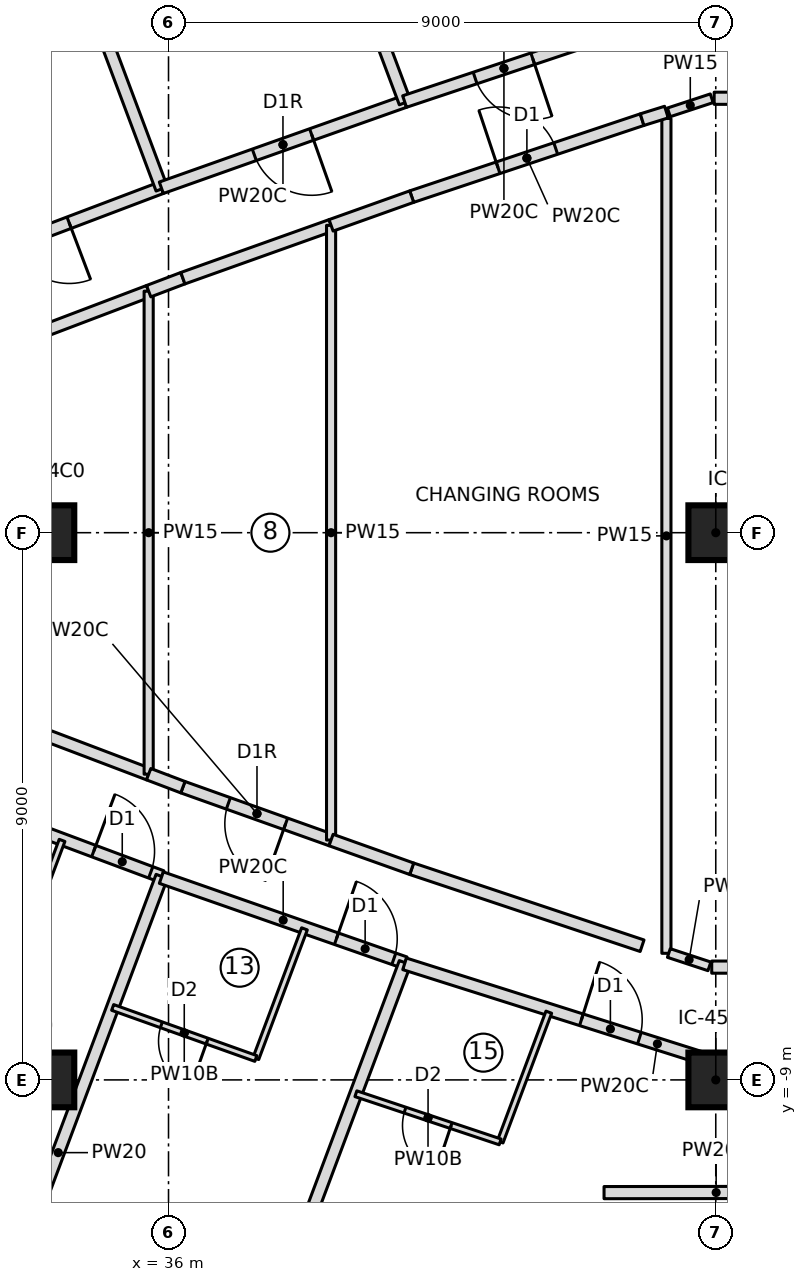
"""IFC4 building model, lengths in metres.
Left out: names, types, materials, properties, quantities, classifications, styles, units other than length and angle.
Written with IfcOpenShell. Run it as: python <this file> out.ifc"""

import sys

from ifc_helpers import new_model, si_unit, direction, frame, frame_2d, origin, origin_2d, place, context, subcontext, project, spatial, rectangle, extrude, element, fill, save


model = new_model("IFC4")
c1 = context("Model", 3, precision=1e-05, world=origin(), true_north=direction((0.0, 1.0)))
c2 = subcontext(c1, "Body", "Model", "MODEL_VIEW")
j1 = project(units=[si_unit("LENGTHUNIT", "METRE"), si_unit("PLANEANGLEUNIT", "RADIAN")], contexts=[c1])
p1 = place(None, origin())
s1 = spatial("IfcSite", under=j1, at=p1, CompositionType="ELEMENT")
p2 = place(p1, origin())
s2 = spatial("IfcBuilding", under=s1, at=p2, CompositionType="ELEMENT")
p3 = place(p2, frame((0.0, 0.0, 245.65)))
s3 = spatial("IfcBuildingStorey", under=s2, at=p3, CompositionType="ELEMENT", Elevation=245.65)
for number, where, z_axis, x_axis in (
    (1, (34.0, -9.0, 0.0), (0.0, 0.0, 1.0), (1.0, 0.0, 0.0)),
    (2, (34.0, 0.0, 0.0), (0.0, 0.0, 1.0), (1.0, 0.0, 0.0)),
    (3, (45.0, -9.0, 0.0), (0.0, 0.0, 1.0), (1.0, 0.0, 0.0)),
    (4, (45.0, 0.0, 0.0), (0.0, 0.0, 1.0), (1.0, 0.0, 0.0)),
):
    element("IfcColumn", number, at=place(p3, frame(where, z_axis=z_axis, x_axis=x_axis)), inside=s3, PredefinedType="COLUMN", context=c2, shape_type="SweptSolid", body=[
        extrude(rectangle(XDim=0.9, YDim=0.9, at=origin_2d()), origin(), (0.0, 0.0, 1.0), 3.55),
    ])
p4 = place(p3, frame((35.882, 5.673, 0.0), z_axis=(0.0, 0.0, 1.0), x_axis=(-0.935189471058, -0.354147784438, 0.0)))
e5 = element("IfcWall", 5, at=p4, inside=s3, PredefinedType="PARTITIONING", context=c2, shape_type="SweptSolid", body=[
    extrude(rectangle(XDim=4.244, YDim=0.2, at=frame_2d((2.122, 0.0))), origin(), (0.0, 0.0, 1.0), 3.25),
])
p5 = place(p4, frame((1.622, 0.0, 0.0)))
e6 = element("IfcOpeningElement", 6, at=p5, cuts=e5, PredefinedType="OPENING", context=c2, shape_type="SweptSolid", body=[
    extrude(rectangle(XDim=1.0, YDim=2.1, at=frame_2d((0.5, 1.05))), frame((0.0, 0.11, 0.0), z_axis=(0.0, -1.0, 0.0), x_axis=(1.0, 0.0, 0.0)), (0.0, 0.0, 1.0), 0.22),
])
p6 = place(p3, frame((35.889, 5.654, 0.0), z_axis=(0.0, 0.0, 1.0), x_axis=(-0.351117925717, 0.936331246002, 0.0)))
e7 = element("IfcWall", 7, at=p6, inside=s3, PredefinedType="PARTITIONING", context=c2, shape_type="SweptSolid", body=[
    extrude(rectangle(XDim=9.701, YDim=0.2, at=frame_2d((4.851, 0.0))), origin(), (0.0, 0.0, 1.0), 3.25),
])
p7 = place(p3, frame((39.882, 7.091, 0.0), z_axis=(0.0, 0.0, 1.0), x_axis=(-0.942537055217, -0.334101630559, 0.0)))
e8 = element("IfcWall", 8, at=p7, inside=s3, PredefinedType="PARTITIONING", context=c2, shape_type="SweptSolid", body=[
    extrude(rectangle(XDim=4.244, YDim=0.2, at=frame_2d((2.122, 0.0))), origin(), (0.0, 0.0, 1.0), 3.25),
])
p8 = place(p7, frame((1.622, 0.0, 0.0)))
e9 = element("IfcOpeningElement", 9, at=p8, cuts=e8, PredefinedType="OPENING", context=c2, shape_type="SweptSolid", body=[
    extrude(rectangle(XDim=1.0, YDim=2.1, at=frame_2d((0.5, 1.05))), frame((0.0, 0.11, 0.0), z_axis=(0.0, -1.0, 0.0), x_axis=(1.0, 0.0, 0.0)), (0.0, 0.0, 1.0), 0.22),
])
p9 = place(p3, frame((39.889, 7.072, 0.0), z_axis=(0.0, 0.0, 1.0), x_axis=(-0.35112895446, 0.936327110224, 0.0)))
e10 = element("IfcWall", 10, at=p9, inside=s3, PredefinedType="PARTITIONING", context=c2, shape_type="SweptSolid", body=[
    extrude(rectangle(XDim=9.706, YDim=0.2, at=frame_2d((4.853, 0.0))), origin(), (0.0, 0.0, 1.0), 3.25),
])
p10 = place(p3, frame((43.15, 8.183, 0.0), z_axis=(0.0, 0.0, 1.0), x_axis=(-0.948477584784, -0.316844238013, 0.0)))
e11 = element("IfcWall", 11, at=p10, inside=s3, PredefinedType="PARTITIONING", context=c2, shape_type="SweptSolid", body=[
    extrude(rectangle(XDim=3.445, YDim=0.2, at=frame_2d((1.723, 0.0))), origin(), (0.0, 0.0, 1.0), 3.25),
])
p11 = place(p10, frame((1.222, 0.0, 0.0)))
e12 = element("IfcOpeningElement", 12, at=p11, cuts=e11, PredefinedType="OPENING", context=c2, shape_type="SweptSolid", body=[
    extrude(rectangle(XDim=1.0, YDim=2.1, at=frame_2d((0.5, 1.05))), frame((0.0, 0.11, 0.0), z_axis=(0.0, -1.0, 0.0), x_axis=(1.0, 0.0, 0.0)), (0.0, 0.0, 1.0), 0.22),
])
p12 = place(p3, frame((31.913, -4.17, 0.0), z_axis=(0.0, 0.0, 1.0), x_axis=(0.936848300955, -0.349735987565, 0.0)))
e13 = element("IfcWall", 13, at=p12, inside=s3, PredefinedType="PARTITIONING", context=c2, shape_type="SweptSolid", body=[
    extrude(rectangle(XDim=4.244, YDim=0.2, at=frame_2d((2.122, 0.0))), origin(), (0.0, 0.0, 1.0), 3.25),
])
p13 = place(p12, frame((3.05, 0.0, 0.0)))
e14 = element("IfcOpeningElement", 14, at=p13, cuts=e13, PredefinedType="OPENING", context=c2, shape_type="SweptSolid", body=[
    extrude(rectangle(XDim=1.0, YDim=2.1, at=frame_2d((0.5, 1.05))), frame((0.0, 0.11, 0.0), z_axis=(0.0, -1.0, 0.0), x_axis=(1.0, 0.0, 0.0)), (0.0, 0.0, 1.0), 0.22),
])
p14 = place(p3, frame((34.25, -5.061, 0.0), z_axis=(0.0, 0.0, 1.0), x_axis=(-0.351135191353, -0.936324771323, 0.0)))
e15 = element("IfcWall", 15, at=p14, inside=s3, PredefinedType="PARTITIONING", context=c2, shape_type="SweptSolid", body=[
    extrude(rectangle(XDim=2.277, YDim=0.1, at=frame_2d((1.139, 0.0))), origin(), (0.0, 0.0, 1.0), 3.25),
])
p15 = place(p3, frame((32.483, -14.738, 0.0), z_axis=(0.0, 0.0, 1.0), x_axis=(0.351117925717, 0.936331246002, 0.0)))
e16 = element("IfcWall", 16, at=p15, inside=s3, PredefinedType="PARTITIONING", context=c2, shape_type="SweptSolid", body=[
    extrude(rectangle(XDim=9.701, YDim=0.2, at=frame_2d((4.851, 0.0))), origin(), (0.0, 0.0, 1.0), 3.25),
])
p16 = place(p3, frame((35.882, -5.673, 0.0), z_axis=(0.0, 0.0, 1.0), x_axis=(0.944107376821, -0.329638075823, 0.0)))
e17 = element("IfcWall", 17, at=p16, inside=s3, PredefinedType="PARTITIONING", context=c2, shape_type="SweptSolid", body=[
    extrude(rectangle(XDim=4.245, YDim=0.2, at=frame_2d((2.122, 0.0))), origin(), (0.0, 0.0, 1.0), 3.25),
])
p17 = place(p16, frame((3.05, 0.0, 0.0)))
e18 = element("IfcOpeningElement", 18, at=p17, cuts=e17, PredefinedType="OPENING", context=c2, shape_type="SweptSolid", body=[
    extrude(rectangle(XDim=1.0, YDim=2.1, at=frame_2d((0.5, 1.05))), frame((0.0, 0.11, 0.0), z_axis=(0.0, -1.0, 0.0), x_axis=(1.0, 0.0, 0.0)), (0.0, 0.0, 1.0), 0.22),
])
p18 = place(p3, frame((38.236, -6.516, 0.0), z_axis=(0.0, 0.0, 1.0), x_axis=(-0.351229183496, -0.936289517543, 0.0)))
e19 = element("IfcWall", 19, at=p18, inside=s3, PredefinedType="PARTITIONING", context=c2, shape_type="SweptSolid", body=[
    extrude(rectangle(XDim=2.277, YDim=0.1, at=frame_2d((1.139, 0.0))), origin(), (0.0, 0.0, 1.0), 3.25),
])
p19 = place(p3, frame((37.436, -8.648, 0.0), z_axis=(0.0, 0.0, 1.0), x_axis=(-0.941896455552, 0.335903359641, 0.0)))
e20 = element("IfcWall", 20, at=p19, inside=s3, PredefinedType="PARTITIONING", context=c2, shape_type="SweptSolid", body=[
    extrude(rectangle(XDim=2.5, YDim=0.1, at=frame_2d((1.25, 0.0))), origin(), (0.0, 0.0, 1.0), 3.25),
])
p20 = place(p19, frame((0.85, 0.0, 0.0)))
e21 = element("IfcOpeningElement", 21, at=p20, cuts=e20, PredefinedType="OPENING", context=c2, shape_type="SweptSolid", body=[
    extrude(rectangle(XDim=0.8, YDim=2.1, at=frame_2d((0.4, 1.05))), frame((0.0, 0.06, 0.0), z_axis=(0.0, -1.0, 0.0), x_axis=(1.0, 0.0, 0.0)), (0.0, 0.0, 1.0), 0.12),
])
p21 = place(p3, frame((36.481, -16.161, 0.0), z_axis=(0.0, 0.0, 1.0), x_axis=(0.35112895446, 0.936327110224, 0.0)))
e22 = element("IfcWall", 22, at=p21, inside=s3, PredefinedType="PARTITIONING", context=c2, shape_type="SweptSolid", body=[
    extrude(rectangle(XDim=9.706, YDim=0.2, at=frame_2d((4.853, 0.0))), origin(), (0.0, 0.0, 1.0), 3.25),
])
p22 = place(p3, frame((39.882, -7.091, 0.0), z_axis=(0.0, 0.0, 1.0), x_axis=(0.953395918068, -0.301722096326, 0.0)))
e23 = element("IfcWall", 23, at=p22, inside=s3, PredefinedType="PARTITIONING", context=c2, shape_type="SweptSolid", body=[
    extrude(rectangle(XDim=8.722, YDim=0.2, at=frame_2d((4.361, 0.0))), origin(), (0.0, 0.0, 1.0), 3.25),
])
p23 = place(p22, frame((3.05, 0.0, 0.0)))
e24 = element("IfcOpeningElement", 24, at=p23, cuts=e23, PredefinedType="OPENING", context=c2, shape_type="SweptSolid", body=[
    extrude(rectangle(XDim=1.0, YDim=2.1, at=frame_2d((0.5, 1.05))), frame((0.0, 0.11, 0.0), z_axis=(0.0, -1.0, 0.0), x_axis=(1.0, 0.0, 0.0)), (0.0, 0.0, 1.0), 0.22),
])
p24 = place(p3, frame((42.254, -7.886, 0.0), z_axis=(0.0, 0.0, 1.0), x_axis=(-0.351111699725, -0.936333580684, 0.0)))
e25 = element("IfcWall", 25, at=p24, inside=s3, PredefinedType="PARTITIONING", context=c2, shape_type="SweptSolid", body=[
    extrude(rectangle(XDim=2.279, YDim=0.1, at=frame_2d((1.139, 0.0))), origin(), (0.0, 0.0, 1.0), 3.25),
])
p25 = place(p3, frame((41.454, -10.02, 0.0), z_axis=(0.0, 0.0, 1.0), x_axis=(-0.948497709953, 0.316783986676, 0.0)))
e26 = element("IfcWall", 26, at=p25, inside=s3, PredefinedType="PARTITIONING", context=c2, shape_type="SweptSolid", body=[
    extrude(rectangle(XDim=2.502, YDim=0.1, at=frame_2d((1.251, 0.0))), origin(), (0.0, 0.0, 1.0), 3.25),
])
p26 = place(p25, frame((0.85, 0.0, 0.0)))
e27 = element("IfcOpeningElement", 27, at=p26, cuts=e26, PredefinedType="OPENING", context=c2, shape_type="SweptSolid", body=[
    extrude(rectangle(XDim=0.8, YDim=2.1, at=frame_2d((0.4, 1.05))), frame((0.0, 0.06, 0.0), z_axis=(0.0, -1.0, 0.0), x_axis=(1.0, 0.0, 0.0)), (0.0, 0.0, 1.0), 0.12),
])
p27 = place(p3, frame((44.56, -18.762, 0.0), z_axis=(0.0, 0.0, 1.0), x_axis=(0.35112901071, 0.936327089129, 0.0)))
e28 = element("IfcWall", 28, at=p27, inside=s3, PredefinedType="PARTITIONING", context=c2, shape_type="SweptSolid", body=[
    extrude(rectangle(XDim=9.608, YDim=0.2, at=frame_2d((4.804, 0.0))), origin(), (0.0, 0.0, 1.0), 3.25),
])
for number, where, z_axis, x_axis in (
    (29, (32.501, 2.768, 0.0), (0.0, 0.0, 1.0), (0.935, 0.355, 0.0)),
    (30, (35.674, -3.972, 0.0), (0.0, 0.0, 1.0), (-0.935, 0.355, 0.0)),
):
    element("IfcWall", number, at=place(p3, frame(where, z_axis=z_axis, x_axis=x_axis)), inside=s3, PredefinedType="PARTITIONING", context=c2, shape_type="SweptSolid", body=[
        extrude(rectangle(XDim=3.393, YDim=0.2, at=frame_2d((1.696, 0.0))), origin(), (0.0, 0.0, 1.0), 3.25),
    ])
p28 = place(p3, frame((35.674, -3.972, 0.0), z_axis=(0.0, 0.0, 1.0), x_axis=(0.0, 1.0, 0.0)))
e31 = element("IfcWall", 31, at=p28, inside=s3, PredefinedType="PARTITIONING", context=c2, shape_type="SweptSolid", body=[
    extrude(rectangle(XDim=7.944, YDim=0.15, at=frame_2d((3.972, 0.0))), origin(), (0.0, 0.0, 1.0), 3.25),
])
p29 = place(p3, frame((38.674, -5.055, 0.0), z_axis=(0.0, 0.0, 1.0), x_axis=(-0.941901902054, 0.335888086879, 0.0)))
e32 = element("IfcWall", 32, at=p29, inside=s3, PredefinedType="PARTITIONING", context=c2, shape_type="SweptSolid", body=[
    extrude(rectangle(XDim=2.588, YDim=0.2, at=frame_2d((1.294, 0.0))), origin(), (0.0, 0.0, 1.0), 3.25),
])
p30 = place(p29, frame((0.794, 0.0, 0.0)))
e33 = element("IfcOpeningElement", 33, at=p30, cuts=e32, PredefinedType="OPENING", context=c2, shape_type="SweptSolid", body=[
    extrude(rectangle(XDim=1.0, YDim=2.1, at=frame_2d((0.5, 1.05))), frame((0.0, 0.11, 0.0), z_axis=(0.0, -1.0, 0.0), x_axis=(1.0, 0.0, 0.0)), (0.0, 0.0, 1.0), 0.22),
])
for number, where, z_axis, x_axis in (
    (34, (36.236, -4.186, 0.0), (0.0, 0.0, 1.0), (-0.935, 0.355, 0.0)),
    (35, (35.674, 3.972, 0.0), (0.0, 0.0, 1.0), (0.935, 0.355, 0.0)),
):
    element("IfcWall", number, at=place(p3, frame(where, z_axis=z_axis, x_axis=x_axis)), inside=s3, PredefinedType="PARTITIONING", context=c2, shape_type="SweptSolid", body=[
        extrude(rectangle(XDim=0.602, YDim=0.2, at=frame_2d((0.301, 0.0))), origin(), (0.0, 0.0, 1.0), 3.25),
    ])
p31 = place(p3, frame((36.236, 4.186, 0.0), z_axis=(0.0, 0.0, 1.0), x_axis=(0.941901902054, 0.335888086879, 0.0)))
e36 = element("IfcWall", 36, at=p31, inside=s3, PredefinedType="PARTITIONING", context=c2, shape_type="SweptSolid", body=[
    extrude(rectangle(XDim=2.588, YDim=0.2, at=frame_2d((1.294, 0.0))), origin(), (0.0, 0.0, 1.0), 3.25),
])
p32 = place(p3, frame((38.674, -5.055, 0.0), z_axis=(0.0, 0.0, 1.0), x_axis=(0.0, 1.0, 0.0)))
e37 = element("IfcWall", 37, at=p32, inside=s3, PredefinedType="PARTITIONING", context=c2, shape_type="SweptSolid", body=[
    extrude(rectangle(XDim=10.109, YDim=0.15, at=frame_2d((5.055, 0.0))), origin(), (0.0, 0.0, 1.0), 3.25),
])
p33 = place(p3, frame((39.999, 5.527, 0.0), z_axis=(0.0, 0.0, 1.0), x_axis=(0.948469186567, 0.316869377084, 0.0)))
e38 = element("IfcWall", 38, at=p33, inside=s3, PredefinedType="PARTITIONING", context=c2, shape_type="SweptSolid", body=[
    extrude(rectangle(XDim=3.995, YDim=0.2, at=frame_2d((1.998, 0.0))), origin(), (0.0, 0.0, 1.0), 3.25),
])
p34 = place(p33, frame((1.498, 0.0, 0.0)))
e39 = element("IfcOpeningElement", 39, at=p34, cuts=e38, PredefinedType="OPENING", context=c2, shape_type="SweptSolid", body=[
    extrude(rectangle(XDim=1.0, YDim=2.1, at=frame_2d((0.5, 1.05))), frame((0.0, 0.11, 0.0), z_axis=(0.0, -1.0, 0.0), x_axis=(1.0, 0.0, 0.0)), (0.0, 0.0, 1.0), 0.22),
])
p35 = place(p3, frame((43.788, -6.793, 0.0), z_axis=(0.0, 0.0, 1.0), x_axis=(-0.948469186567, 0.316869377084, 0.0)))
e40 = element("IfcWall", 40, at=p35, inside=s3, PredefinedType="PARTITIONING", context=c2, shape_type="SweptSolid", body=[
    extrude(rectangle(XDim=3.995, YDim=0.2, at=frame_2d((1.998, 0.0))), origin(), (0.0, 0.0, 1.0), 3.25),
])
for number, where, z_axis, x_axis in (
    (41, (39.999, -5.527, 0.0), (0.0, 0.0, 1.0), (-0.942, 0.336, 0.0)),
    (42, (38.674, 5.055, 0.0), (0.0, 0.0, 1.0), (0.942, 0.336, 0.0)),
):
    element("IfcWall", number, at=place(p3, frame(where, z_axis=z_axis, x_axis=x_axis)), inside=s3, PredefinedType="PARTITIONING", context=c2, shape_type="SweptSolid", body=[
        extrude(rectangle(XDim=1.407, YDim=0.2, at=frame_2d((0.704, 0.0))), origin(), (0.0, 0.0, 1.0), 3.25),
    ])
p36 = place(p3, frame((44.188, -6.918, 0.0), z_axis=(0.0, 0.0, 1.0), x_axis=(0.0, 1.0, 0.0)))
e43 = element("IfcWall", 43, at=p36, inside=s3, PredefinedType="PARTITIONING", context=c2, shape_type="SweptSolid", body=[
    extrude(rectangle(XDim=13.731, YDim=0.15, at=frame_2d((6.866, 0.0))), origin(), (0.0, 0.0, 1.0), 3.25),
])
p37 = place(p3, frame((44.228, 6.913, 0.0), z_axis=(0.0, 0.0, 1.0), x_axis=(0.949957891139, 0.312377984279, 0.0)))
e44 = element("IfcWall", 44, at=p37, inside=s3, PredefinedType="PARTITIONING", context=c2, shape_type="SweptSolid", body=[
    extrude(rectangle(XDim=0.742, YDim=0.15, at=frame_2d((0.371, 0.0))), origin(), (0.0, 0.0, 1.0), 3.25),
])
p38 = place(p3, frame((44.973, 7.145, 0.0), z_axis=(0.0, 0.0, 1.0), x_axis=(0.999999991552, 0.0001299883, 0.0)))
e45 = element("IfcWall", 45, at=p38, inside=s3, PredefinedType="PARTITIONING", context=c2, shape_type="SweptSolid", body=[
    extrude(rectangle(XDim=1.878, YDim=0.2, at=frame_2d((0.939, 0.0))), origin(), (0.0, 0.0, 1.0), 3.25),
])
p39 = place(p3, frame((46.852, -7.145, 0.0), z_axis=(0.0, 0.0, 1.0), x_axis=(-0.999999991898, 0.000127291241, 0.0)))
e46 = element("IfcWall", 46, at=p39, inside=s3, PredefinedType="PARTITIONING", context=c2, shape_type="SweptSolid", body=[
    extrude(rectangle(XDim=1.918, YDim=0.2, at=frame_2d((0.959, 0.0))), origin(), (0.0, 0.0, 1.0), 3.25),
])
p40 = place(p3, frame((44.896, -7.133, 0.0), z_axis=(0.0, 0.0, 1.0), x_axis=(-0.94982393739, 0.312785050732, 0.0)))
e47 = element("IfcWall", 47, at=p40, inside=s3, PredefinedType="PARTITIONING", context=c2, shape_type="SweptSolid", body=[
    extrude(rectangle(XDim=0.702, YDim=0.15, at=frame_2d((0.351, 0.0))), origin(), (0.0, 0.0, 1.0), 3.25),
])
p41 = place(p3, frame((43.788, 6.793, 0.0), z_axis=(0.0, 0.0, 1.0), x_axis=(0.95462504626, 0.297810377679, 0.0)))
e48 = element("IfcWall", 48, at=p41, inside=s3, PredefinedType="PARTITIONING", context=c2, shape_type="SweptSolid", body=[
    extrude(rectangle(XDim=0.419, YDim=0.2, at=frame_2d((0.209, 0.0))), origin(), (0.0, 0.0, 1.0), 3.25),
])
p42 = place(p3, frame((46.85, -10.85, 0.0), z_axis=(0.0, 0.0, 1.0), x_axis=(-0.999999438919, -0.00105932144, 0.0)))
e49 = element("IfcWall", 49, at=p42, inside=s3, PredefinedType="PARTITIONING", context=c2, shape_type="SweptSolid", body=[
    extrude(rectangle(XDim=3.688, YDim=0.2, at=frame_2d((1.844, 0.0))), origin(), (0.0, 0.0, 1.0), 3.25),
])
p43 = place(p5, origin())
e50 = element("IfcDoor", 50, at=p43, inside=s3, OperationType="SINGLE_SWING_LEFT", PredefinedType="DOOR", context=c2, shape_type="SweptSolid", body=[
    extrude(rectangle(XDim=1.0, YDim=2.1, at=frame_2d((0.5, 1.05))), frame((0.0, 0.025, 0.0), z_axis=(0.0, -1.0, 0.0), x_axis=(1.0, 0.0, 0.0)), (0.0, 0.0, 1.0), 0.05),
])
fill(e6, e50)
p44 = place(p8, origin())
e51 = element("IfcDoor", 51, at=p44, inside=s3, OperationType="SINGLE_SWING_RIGHT", PredefinedType="DOOR", context=c2, shape_type="SweptSolid", body=[
    extrude(rectangle(XDim=1.0, YDim=2.1, at=frame_2d((0.5, 1.05))), frame((0.0, 0.025, 0.0), z_axis=(0.0, -1.0, 0.0), x_axis=(1.0, 0.0, 0.0)), (0.0, 0.0, 1.0), 0.05),
])
fill(e9, e51)
p45 = place(p11, origin())
e52 = element("IfcDoor", 52, at=p45, inside=s3, OperationType="SINGLE_SWING_LEFT", PredefinedType="DOOR", context=c2, shape_type="SweptSolid", body=[
    extrude(rectangle(XDim=1.0, YDim=2.1, at=frame_2d((0.5, 1.05))), frame((0.0, 0.025, 0.0), z_axis=(0.0, -1.0, 0.0), x_axis=(1.0, 0.0, 0.0)), (0.0, 0.0, 1.0), 0.05),
])
fill(e12, e52)
p46 = place(p13, origin())
e53 = element("IfcDoor", 53, at=p46, inside=s3, OperationType="SINGLE_SWING_LEFT", PredefinedType="DOOR", context=c2, shape_type="SweptSolid", body=[
    extrude(rectangle(XDim=1.0, YDim=2.1, at=frame_2d((0.5, 1.05))), frame((0.0, 0.025, 0.0), z_axis=(0.0, -1.0, 0.0), x_axis=(1.0, 0.0, 0.0)), (0.0, 0.0, 1.0), 0.05),
])
fill(e14, e53)
p47 = place(p20, origin())
e54 = element("IfcDoor", 54, at=p47, inside=s3, OperationType="SINGLE_SWING_LEFT", PredefinedType="DOOR", context=c2, shape_type="SweptSolid", body=[
    extrude(rectangle(XDim=0.8, YDim=2.1, at=frame_2d((0.4, 1.05))), frame((0.0, 0.025, 0.0), z_axis=(0.0, -1.0, 0.0), x_axis=(1.0, 0.0, 0.0)), (0.0, 0.0, 1.0), 0.05),
])
fill(e21, e54)
p48 = place(p17, origin())
e55 = element("IfcDoor", 55, at=p48, inside=s3, OperationType="SINGLE_SWING_LEFT", PredefinedType="DOOR", context=c2, shape_type="SweptSolid", body=[
    extrude(rectangle(XDim=1.0, YDim=2.1, at=frame_2d((0.5, 1.05))), frame((0.0, 0.025, 0.0), z_axis=(0.0, -1.0, 0.0), x_axis=(1.0, 0.0, 0.0)), (0.0, 0.0, 1.0), 0.05),
])
fill(e18, e55)
p49 = place(p26, origin())
e56 = element("IfcDoor", 56, at=p49, inside=s3, OperationType="SINGLE_SWING_LEFT", PredefinedType="DOOR", context=c2, shape_type="SweptSolid", body=[
    extrude(rectangle(XDim=0.8, YDim=2.1, at=frame_2d((0.4, 1.05))), frame((0.0, 0.025, 0.0), z_axis=(0.0, -1.0, 0.0), x_axis=(1.0, 0.0, 0.0)), (0.0, 0.0, 1.0), 0.05),
])
fill(e27, e56)
p50 = place(p23, origin())
e57 = element("IfcDoor", 57, at=p50, inside=s3, OperationType="SINGLE_SWING_LEFT", PredefinedType="DOOR", context=c2, shape_type="SweptSolid", body=[
    extrude(rectangle(XDim=1.0, YDim=2.1, at=frame_2d((0.5, 1.05))), frame((0.0, 0.025, 0.0), z_axis=(0.0, -1.0, 0.0), x_axis=(1.0, 0.0, 0.0)), (0.0, 0.0, 1.0), 0.05),
])
fill(e24, e57)
p51 = place(p30, origin())
e58 = element("IfcDoor", 58, at=p51, inside=s3, OperationType="SINGLE_SWING_RIGHT", PredefinedType="DOOR", context=c2, shape_type="SweptSolid", body=[
    extrude(rectangle(XDim=1.0, YDim=2.1, at=frame_2d((0.5, 1.05))), frame((0.0, 0.025, 0.0), z_axis=(0.0, -1.0, 0.0), x_axis=(1.0, 0.0, 0.0)), (0.0, 0.0, 1.0), 0.05),
])
fill(e33, e58)
p52 = place(p34, origin())
e59 = element("IfcDoor", 59, at=p52, inside=s3, OperationType="SINGLE_SWING_LEFT", PredefinedType="DOOR", context=c2, shape_type="SweptSolid", body=[
    extrude(rectangle(XDim=1.0, YDim=2.1, at=frame_2d((0.5, 1.05))), frame((0.0, 0.025, 0.0), z_axis=(0.0, -1.0, 0.0), x_axis=(1.0, 0.0, 0.0)), (0.0, 0.0, 1.0), 0.05),
])
fill(e39, e59)
save(model, sys.argv[1])
